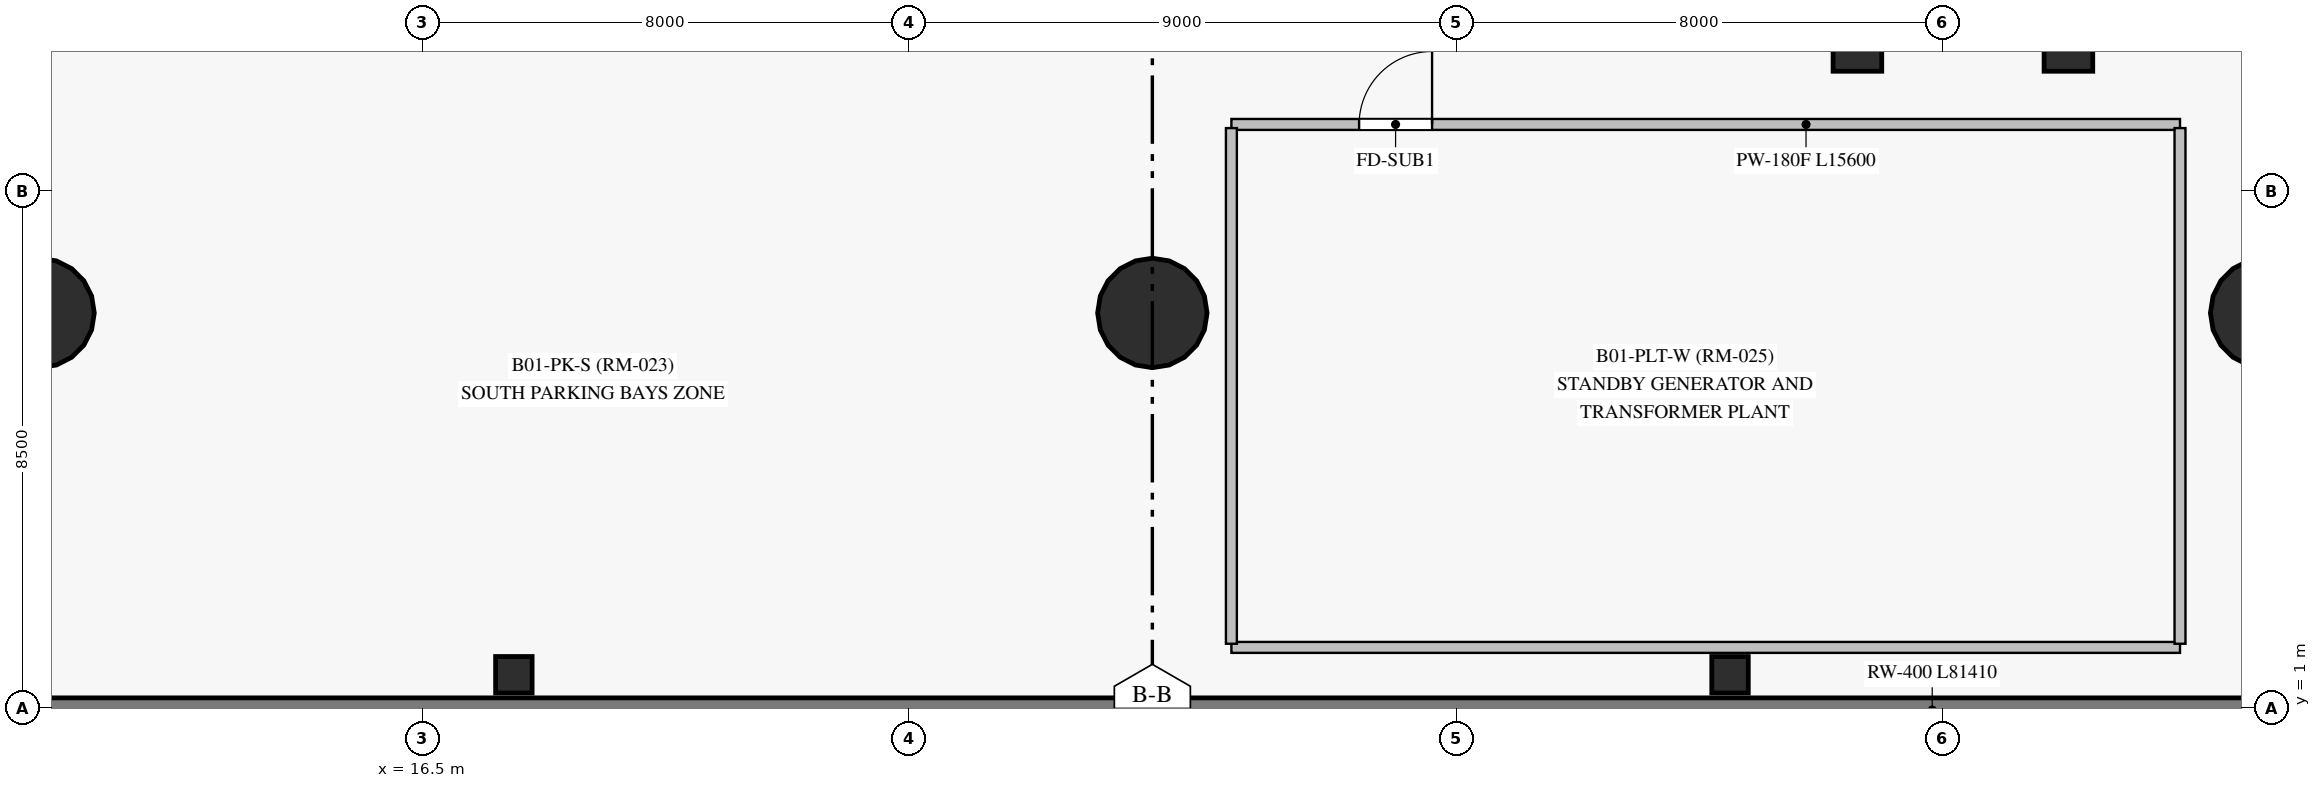
"""IFC4 building model, lengths in metres.
Left out: names, types, materials, properties, quantities, classifications, styles, units other than length and angle.
Written with IfcOpenShell. Run it as: python <this file> out.ifc"""

import sys

from ifc_helpers import new_model, si_unit, direction, frame, frame_2d, origin, origin_with_axes, origin_2d, place, context, subcontext, project, spatial, rectangle, circle, extrude, source, transform, mapped, element, fill, save


model = new_model("IFC4")
c1 = context("Model", 3, precision=1e-05, world=origin(), true_north=direction((0.0, 1.0)))
c2 = subcontext(c1, "Body", "Model", "MODEL_VIEW")
j1 = project(units=[si_unit("LENGTHUNIT", "METRE"), si_unit("PLANEANGLEUNIT", "RADIAN")], contexts=[c1])
p1 = place(None, origin())
s1 = spatial("IfcSite", under=j1, at=p1, CompositionType="ELEMENT")
p2 = place(p1, origin())
s2 = spatial("IfcBuilding", under=s1, at=p2, CompositionType="ELEMENT")
p3 = place(p2, frame((0.0, 0.0, -4.2)))
s3 = spatial("IfcBuildingStorey", under=s2, at=p3, CompositionType="ELEMENT", Elevation=-4.2)
m1 = source(origin_with_axes(), c2, "Body", "SweptSolid", [
    extrude(rectangle(XDim=0.8, YDim=0.8, at=origin_2d()), origin(), (0.0, 0.0, 1.0), 4.2),
])
for number, where, z_axis, x_axis in (
    (1, (40.095, 11.875, 0.0), (0.0, 0.0, 1.0), (1.0, 0.0, 0.0)),
    (2, (43.565, 11.875, 0.0), (0.0, 0.0, 1.0), (1.0, 0.0, 0.0)),
):
    element("IfcColumn", number, at=place(p3, frame(where, z_axis=z_axis, x_axis=x_axis)), inside=s3, PredefinedType="COLUMN", context=c2, shape_type="MappedRepresentation", body=[
        mapped(m1, transform((0.0, 0.0, 0.0), scale=1.0)),
    ])
m2 = source(origin_with_axes(), c2, "Body", "SweptSolid", [
    extrude(rectangle(XDim=0.6, YDim=0.6, at=origin_2d()), origin(), (0.0, 0.0, 1.0), 4.2),
])
for number, where, z_axis, x_axis in (
    (3, (18.0, 1.55, 0.0), (0.0, 0.0, 1.0), (1.0, 0.0, 0.0)),
    (4, (38.0, 1.55, 0.0), (0.0, 0.0, 1.0), (1.0, 0.0, 0.0)),
):
    element("IfcColumn", number, at=place(p3, frame(where, z_axis=z_axis, x_axis=x_axis)), inside=s3, PredefinedType="COLUMN", context=c2, shape_type="MappedRepresentation", body=[
        mapped(m2, transform((0.0, 0.0, 0.0), scale=1.0)),
    ])
p4 = place(p3, frame((0.62, 0.97, 0.0), z_axis=(0.0, 0.0, 1.0), x_axis=(1.0, 0.0, 0.0)))
e5 = element("IfcWall", 5, at=p4, inside=s3, PredefinedType="USERDEFINED", context=c2, shape_type="SweptSolid", body=[
    extrude(rectangle(XDim=81.41, YDim=0.4, at=frame_2d((40.705, 0.0))), origin(), (0.0, 0.0, 1.0), 3.85),
])
m3 = source(origin_with_axes(), c2, "Body", "SweptSolid", [
    extrude(circle(Radius=0.9, at=origin_2d()), origin(), (0.0, 0.0, 1.0), 4.2),
])
for number, where, z_axis, x_axis in (
    (6, (10.2, 7.5, 0.0), (0.0, 0.0, 1.0), (1.0, 0.0, 0.0)),
    (7, (28.5, 7.5, 0.0), (0.0, 0.0, 1.0), (1.0, 0.0, 0.0)),
    (8, (46.8, 7.5, 0.0), (0.0, 0.0, 1.0), (1.0, 0.0, 0.0)),
):
    element("IfcColumn", number, at=place(p3, frame(where, z_axis=z_axis, x_axis=x_axis)), inside=s3, PredefinedType="COLUMN", context=c2, shape_type="MappedRepresentation", body=[
        mapped(m3, transform((0.0, 0.0, 0.0), scale=1.0)),
    ])
p5 = place(p3, frame((29.8, 10.6, 0.0), z_axis=(0.0, 0.0, 1.0), x_axis=(1.0, 0.0, 0.0)))
e9 = element("IfcWall", 9, at=p5, inside=s3, PredefinedType="PARTITIONING", context=c2, shape_type="SweptSolid", body=[
    extrude(rectangle(XDim=15.6, YDim=0.18, at=frame_2d((7.8, 0.0))), origin(), (0.0, 0.0, 1.0), 3.85),
])
p6 = place(p5, frame((2.1, 0.0, 0.0)))
e10 = element("IfcOpeningElement", 10, at=p6, cuts=e9, PredefinedType="OPENING", context=c2, shape_type="SweptSolid", body=[
    extrude(rectangle(XDim=1.2, YDim=2.15, at=frame_2d((0.6, 1.075))), frame((0.0, 0.1, 0.0), z_axis=(0.0, -1.0, 0.0), x_axis=(1.0, 0.0, 0.0)), (0.0, 0.0, 1.0), 0.2),
])
p7 = place(p3, frame((29.8, 2.0, 0.0), z_axis=(0.0, 0.0, 1.0), x_axis=(1.0, 0.0, 0.0)))
e11 = element("IfcWall", 11, at=p7, inside=s3, PredefinedType="PARTITIONING", context=c2, shape_type="SweptSolid", body=[
    extrude(rectangle(XDim=15.6, YDim=0.18, at=frame_2d((7.8, 0.0))), origin(), (0.0, 0.0, 1.0), 3.85),
])
for number, where, z_axis, x_axis in (
    (12, (29.8, 2.06, 0.0), (0.0, 0.0, 1.0), (0.0, 1.0, 0.0)),
    (13, (45.4, 2.06, 0.0), (0.0, 0.0, 1.0), (0.0, 1.0, 0.0)),
):
    element("IfcWall", number, at=place(p3, frame(where, z_axis=z_axis, x_axis=x_axis)), inside=s3, PredefinedType="PARTITIONING", context=c2, shape_type="SweptSolid", body=[
        extrude(rectangle(XDim=8.48, YDim=0.18, at=frame_2d((4.24, 0.0))), origin(), (0.0, 0.0, 1.0), 3.85),
    ])
m4 = source(origin_with_axes(), c2, "Body", "SweptSolid", [
    extrude(rectangle(XDim=1.2, YDim=2.15, at=frame_2d((0.6, 1.075))), frame((0.0, 0.025, 0.0), z_axis=(0.0, -1.0, 0.0), x_axis=(1.0, 0.0, 0.0)), (0.0, 0.0, 1.0), 0.05),
])
p8 = place(p6, origin())
e14 = element("IfcDoor", 14, at=p8, inside=s3, OperationType="SINGLE_SWING_RIGHT", PredefinedType="DOOR", context=c2, shape_type="MappedRepresentation", body=[
    mapped(m4, transform((0.0, 0.0, 0.0), scale=1.0)),
])
fill(e10, e14)
save(model, sys.argv[1])
